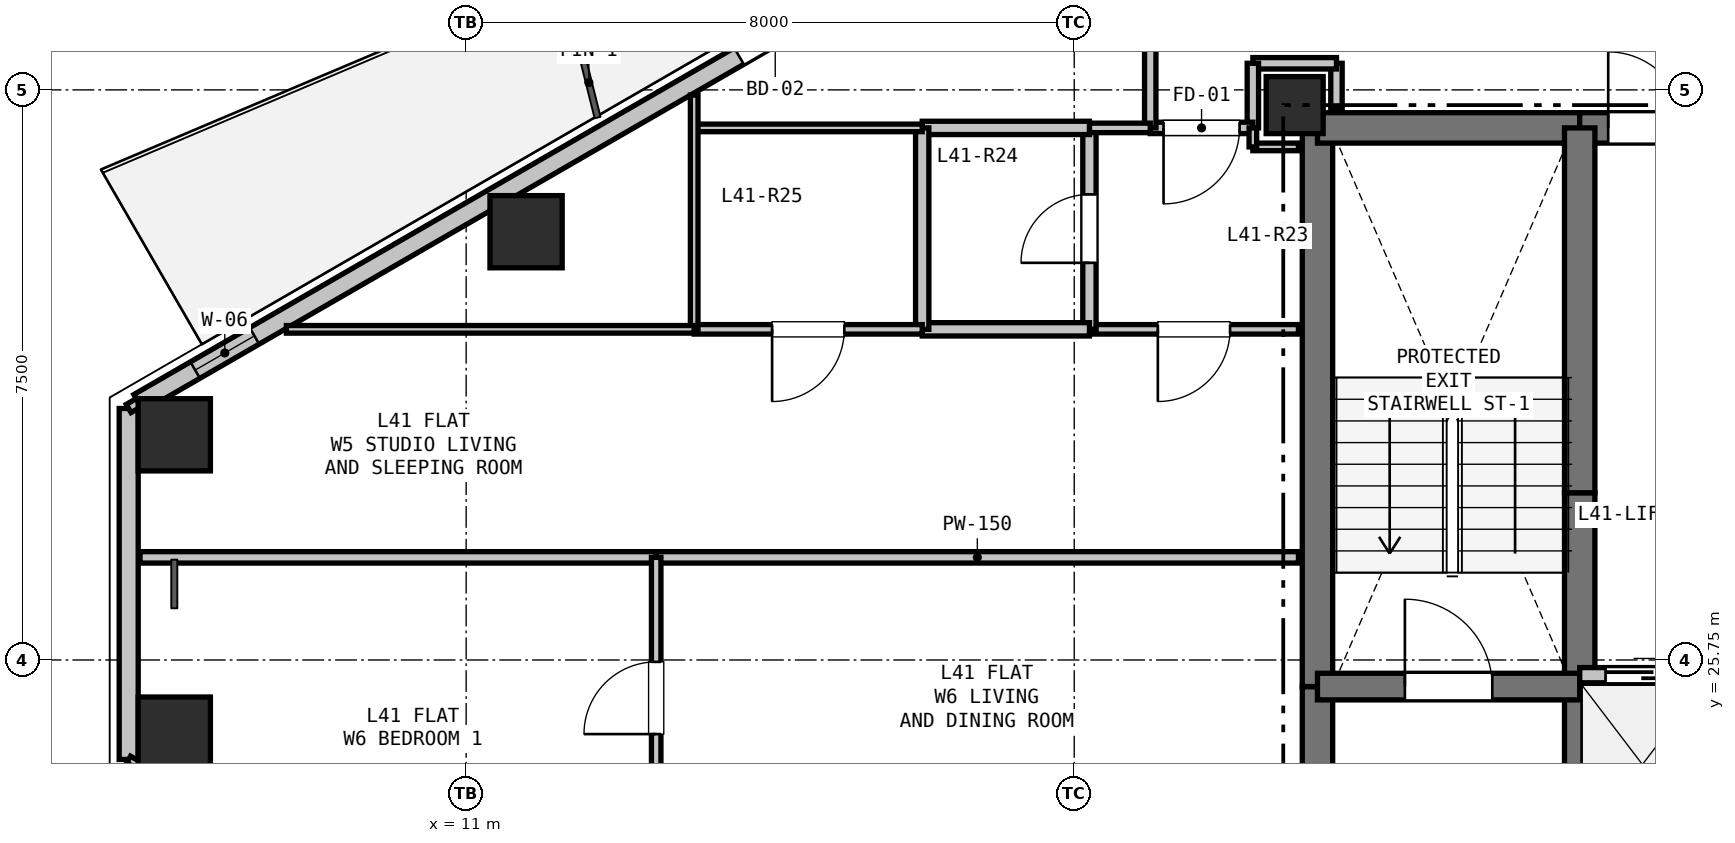
"""IFC4 building model, lengths in metres.
Left out: names, types, materials, properties, quantities, classifications, styles, units other than length and angle.
Written with IfcOpenShell. Run it as: python <this file> out.ifc"""

import sys

from ifc_helpers import new_model, si_unit, direction, frame, frame_2d, origin, origin_2d, place, context, subcontext, project, spatial, rectangle, hollow_rectangle, extrude, element, fill, save


model = new_model("IFC4")
c1 = context("Model", 3, precision=1e-05, world=origin(), true_north=direction((0.0, 1.0)))
c2 = subcontext(c1, "Body", "Model", "MODEL_VIEW")
j1 = project(units=[si_unit("LENGTHUNIT", "METRE"), si_unit("PLANEANGLEUNIT", "RADIAN")], contexts=[c1])
p1 = place(None, origin())
s1 = spatial("IfcSite", under=j1, at=p1, CompositionType="ELEMENT")
p2 = place(p1, origin())
s2 = spatial("IfcBuilding", under=s1, at=p2, CompositionType="ELEMENT")
p3 = place(p2, frame((0.0, 0.0, 147.6)))
s3 = spatial("IfcBuildingStorey", under=s2, at=p3, CompositionType="ELEMENT", Elevation=147.6)
p4 = place(p3, frame((21.9, 33.05, 0.0), z_axis=(0.0, 0.0, 1.0), x_axis=(1.0, 0.0, 0.0)))
e1 = element("IfcColumn", 1, at=p4, inside=s3, PredefinedType="COLUMN", context=c2, shape_type="SweptSolid", body=[
    extrude(rectangle(XDim=0.75, YDim=0.75, at=origin_2d()), origin(), (0.0, 0.0, 1.0), 3.3),
])
for number, where, z_axis, x_axis in (
    (2, (7.16, 28.712, 0.0), (0.0, 0.0, 1.0), (1.0, 0.0, 0.0)),
    (3, (11.788, 31.384, 0.0), (0.0, 0.0, 1.0), (1.0, 0.0, 0.0)),
    (4, (7.16, 24.788, 0.0), (0.0, 0.0, 1.0), (1.0, 0.0, 0.0)),
):
    element("IfcColumn", number, at=place(p3, frame(where, z_axis=z_axis, x_axis=x_axis)), inside=s3, PredefinedType="COLUMN", context=c2, shape_type="SweptSolid", body=[
        extrude(hollow_rectangle(XDim=0.95, YDim=0.95, WallThickness=0.028, at=origin_2d()), origin(), (0.0, 0.0, 1.0), 3.3),
    ])
p5 = place(p3, frame((6.56, 24.441, 0.0), z_axis=(0.0, 0.0, 1.0), x_axis=(0.0, 1.0, 0.0)))
e5 = element("IfcWall", 5, at=p5, inside=s3, PredefinedType="SOLIDWALL", context=c2, shape_type="SweptSolid", body=[
    extrude(rectangle(XDim=4.617, YDim=0.25, at=frame_2d((2.309, 0.0))), origin(), (0.0, 0.0, 1.0), 2.68),
])
p6 = place(p3, frame((6.69, 29.134, 0.0), z_axis=(0.0, 0.0, 1.0), x_axis=(0.866027848477, 0.499995765644, 0.0)))
e6 = element("IfcWall", 6, at=p6, inside=s3, PredefinedType="SOLIDWALL", context=c2, shape_type="SweptSolid", body=[
    extrude(rectangle(XDim=11.186, YDim=0.25, at=frame_2d((5.593, 0.0))), origin(), (0.0, 0.0, 1.0), 2.68),
])
p7 = place(p6, frame((9.122, 0.0, 0.0)))
e7 = element("IfcOpeningElement", 7, at=p7, cuts=e6, PredefinedType="OPENING", context=c2, shape_type="SweptSolid", body=[
    extrude(rectangle(XDim=1.1, YDim=2.1, at=frame_2d((0.55, 1.05))), frame((0.0, 0.135, 0.0), z_axis=(0.0, -1.0, 0.0), x_axis=(1.0, 0.0, 0.0)), (0.0, 0.0, 1.0), 0.27),
])
p8 = place(p6, frame((0.86, 0.0, 0.9)))
e8 = element("IfcOpeningElement", 8, at=p8, cuts=e6, PredefinedType="OPENING", context=c2, shape_type="SweptSolid", body=[
    extrude(rectangle(XDim=0.9, YDim=1.4, at=frame_2d((0.45, 0.7))), frame((0.0, 0.135, 0.0), z_axis=(0.0, -1.0, 0.0), x_axis=(1.0, 0.0, 0.0)), (0.0, 0.0, 1.0), 0.27),
])
p9 = place(p3, frame((16.378, 18.773, 0.0), z_axis=(0.0, 0.0, 1.0), x_axis=(-0.866027848477, 0.499995765644, 0.0)))
e9 = element("IfcWall", 9, at=p9, inside=s3, PredefinedType="SOLIDWALL", context=c2, shape_type="SweptSolid", body=[
    extrude(rectangle(XDim=11.186, YDim=0.25, at=frame_2d((5.593, 0.0))), origin(), (0.0, 0.0, 1.0), 2.68),
])
p10 = place(p9, frame((6.757, 0.0, 0.9)))
e10 = element("IfcOpeningElement", 10, at=p10, cuts=e9, PredefinedType="OPENING", context=c2, shape_type="SweptSolid", body=[
    extrude(rectangle(XDim=1.2, YDim=1.4, at=frame_2d((0.6, 0.7))), frame((0.0, 0.135, 0.0), z_axis=(0.0, -1.0, 0.0), x_axis=(1.0, 0.0, 0.0)), (0.0, 0.0, 1.0), 0.27),
])
p11 = place(p3, frame((22.2, 20.75, 0.0), z_axis=(0.0, 0.0, 1.0), x_axis=(0.0, 1.0, 0.0)))
e11 = element("IfcWall", 11, at=p11, inside=s3, PredefinedType="SHEAR", context=c2, shape_type="SweptSolid", body=[
    extrude(rectangle(XDim=4.65, YDim=0.4, at=frame_2d((2.325, 0.0))), origin(), (0.0, 0.0, 1.0), 3.06),
])
p12 = place(p3, frame((22.2, 25.4, 0.0), z_axis=(0.0, 0.0, 1.0), x_axis=(0.0, 1.0, 0.0)))
e12 = element("IfcWall", 12, at=p12, inside=s3, PredefinedType="SHEAR", context=c2, shape_type="SweptSolid", body=[
    extrude(rectangle(XDim=7.35, YDim=0.4, at=frame_2d((3.675, 0.0))), origin(), (0.0, 0.0, 1.0), 3.06),
])
p13 = place(p3, frame((22.2, 32.75, 0.0), z_axis=(0.0, 0.0, 1.0), x_axis=(1.0, 0.0, 0.0)))
e13 = element("IfcWall", 13, at=p13, inside=s3, PredefinedType="SHEAR", context=c2, shape_type="SweptSolid", body=[
    extrude(rectangle(XDim=3.45, YDim=0.4, at=frame_2d((1.725, 0.0))), origin(), (0.0, 0.0, 1.0), 3.06),
])
p14 = place(p3, frame((25.65, 32.75, 0.0), z_axis=(0.0, 0.0, 1.0), x_axis=(1.0, 0.0, 0.0)))
e14 = element("IfcWall", 14, at=p14, inside=s3, PredefinedType="SHEAR", context=c2, shape_type="SweptSolid", body=[
    extrude(rectangle(XDim=1.75, YDim=0.4, at=frame_2d((0.875, 0.0))), origin(), (0.0, 0.0, 1.0), 3.06),
])
p15 = place(p14, frame((0.375, 0.0, 0.0)))
e15 = element("IfcOpeningElement", 15, at=p15, cuts=e14, PredefinedType="OPENING", context=c2, shape_type="SweptSolid", body=[
    extrude(rectangle(XDim=1.0, YDim=2.15, at=frame_2d((0.5, 1.075))), frame((0.0, 0.21, 0.0), z_axis=(0.0, -1.0, 0.0), x_axis=(1.0, 0.0, 0.0)), (0.0, 0.0, 1.0), 0.42),
])
p16 = place(p3, frame((25.65, 22.75, 0.0), z_axis=(0.0, 0.0, 1.0), x_axis=(0.0, 1.0, 0.0)))
e16 = element("IfcWall", 16, at=p16, inside=s3, PredefinedType="SHEAR", context=c2, shape_type="SweptSolid", body=[
    extrude(rectangle(XDim=2.8, YDim=0.4, at=frame_2d((1.4, 0.0))), origin(), (0.0, 0.0, 1.0), 3.06),
])
p17 = place(p3, frame((25.65, 25.55, 0.0), z_axis=(0.0, 0.0, 1.0), x_axis=(0.0, 1.0, 0.0)))
e17 = element("IfcWall", 17, at=p17, inside=s3, PredefinedType="SHEAR", context=c2, shape_type="SweptSolid", body=[
    extrude(rectangle(XDim=2.4, YDim=0.4, at=frame_2d((1.2, 0.0))), origin(), (0.0, 0.0, 1.0), 3.06),
])
p18 = place(p3, frame((25.65, 27.95, 0.0), z_axis=(0.0, 0.0, 1.0), x_axis=(0.0, 1.0, 0.0)))
e18 = element("IfcWall", 18, at=p18, inside=s3, PredefinedType="SHEAR", context=c2, shape_type="SweptSolid", body=[
    extrude(rectangle(XDim=4.8, YDim=0.4, at=frame_2d((2.4, 0.0))), origin(), (0.0, 0.0, 1.0), 3.06),
])
p19 = place(p3, frame((22.2, 25.4, 0.0), z_axis=(0.0, 0.0, 1.0), x_axis=(1.0, 0.0, 0.0)))
e19 = element("IfcWall", 19, at=p19, inside=s3, PredefinedType="SHEAR", context=c2, shape_type="SweptSolid", body=[
    extrude(rectangle(XDim=3.45, YDim=0.35, at=frame_2d((1.725, 0.0))), origin(), (0.0, 0.0, 1.0), 3.06),
])
p20 = place(p19, frame((1.15, 0.0, 0.0)))
e20 = element("IfcOpeningElement", 20, at=p20, cuts=e19, PredefinedType="OPENING", context=c2, shape_type="SweptSolid", body=[
    extrude(rectangle(XDim=1.15, YDim=2.15, at=frame_2d((0.575, 1.075))), frame((0.0, 0.185, 0.0), z_axis=(0.0, -1.0, 0.0), x_axis=(1.0, 0.0, 0.0)), (0.0, 0.0, 1.0), 0.37),
])
p21 = place(p3, frame((25.65, 25.55, 0.0), z_axis=(0.0, 0.0, 1.0), x_axis=(1.0, 0.0, 0.0)))
e21 = element("IfcWall", 21, at=p21, inside=s3, PredefinedType="PARTITIONING", context=c2, shape_type="SweptSolid", body=[
    extrude(rectangle(XDim=4.95, YDim=0.2, at=frame_2d((2.475, 0.0))), origin(), (0.0, 0.0, 1.0), 3.06),
])
p22 = place(p21, frame((0.34, 0.0, 0.0)))
e22 = element("IfcOpeningElement", 22, at=p22, cuts=e21, PredefinedType="OPENING", context=c2, shape_type="SweptSolid", body=[
    extrude(rectangle(XDim=1.1, YDim=2.15, at=frame_2d((0.55, 1.075))), frame((0.0, 0.11, 0.0), z_axis=(0.0, -1.0, 0.0), x_axis=(1.0, 0.0, 0.0)), (0.0, 0.0, 1.0), 0.22),
])
p23 = place(p21, frame((1.99, 0.0, 0.0)))
e23 = element("IfcOpeningElement", 23, at=p23, cuts=e21, PredefinedType="OPENING", context=c2, shape_type="SweptSolid", body=[
    extrude(rectangle(XDim=1.1, YDim=2.15, at=frame_2d((0.55, 1.075))), frame((0.0, 0.11, 0.0), z_axis=(0.0, -1.0, 0.0), x_axis=(1.0, 0.0, 0.0)), (0.0, 0.0, 1.0), 0.22),
])
p24 = place(p21, frame((3.64, 0.0, 0.0)))
e24 = element("IfcOpeningElement", 24, at=p24, cuts=e21, PredefinedType="OPENING", context=c2, shape_type="SweptSolid", body=[
    extrude(rectangle(XDim=1.1, YDim=2.15, at=frame_2d((0.55, 1.075))), frame((0.0, 0.11, 0.0), z_axis=(0.0, -1.0, 0.0), x_axis=(1.0, 0.0, 0.0)), (0.0, 0.0, 1.0), 0.22),
])
p25 = place(p3, frame((22.45, 33.0, 0.0), z_axis=(0.0, 0.0, 1.0), x_axis=(0.0, 1.0, 0.0)))
e25 = element("IfcWall", 25, at=p25, inside=s3, PredefinedType="PARTITIONING", context=c2, shape_type="SweptSolid", body=[
    extrude(rectangle(XDim=0.6, YDim=0.15, at=frame_2d((0.3, 0.0))), origin(), (0.0, 0.0, 1.0), 2.585),
])
p26 = place(p3, frame((22.45, 33.6, 0.0), z_axis=(0.0, 0.0, 1.0), x_axis=(-1.0, 0.0, 0.0)))
e26 = element("IfcWall", 26, at=p26, inside=s3, PredefinedType="PARTITIONING", context=c2, shape_type="SweptSolid", body=[
    extrude(rectangle(XDim=1.1, YDim=0.15, at=frame_2d((0.55, 0.0))), origin(), (0.0, 0.0, 1.0), 3.06),
])
p27 = place(p3, frame((21.35, 33.6, 0.0), z_axis=(0.0, 0.0, 1.0), x_axis=(0.0, -1.0, 0.0)))
e27 = element("IfcWall", 27, at=p27, inside=s3, PredefinedType="PARTITIONING", context=c2, shape_type="SweptSolid", body=[
    extrude(rectangle(XDim=0.85, YDim=0.15, at=frame_2d((0.425, 0.0))), origin(), (0.0, 0.0, 1.0), 2.433),
])
p28 = place(p3, frame((21.35, 32.75, 0.0), z_axis=(0.0, 0.0, 1.0), x_axis=(-1.0, 0.0, 0.0)))
e28 = element("IfcWall", 28, at=p28, inside=s3, PredefinedType="PARTITIONING", context=c2, shape_type="SweptSolid", body=[
    extrude(rectangle(XDim=1.35, YDim=0.15, at=frame_2d((0.675, 0.0))), origin(), (0.0, 0.0, 1.0), 2.433),
])
p29 = place(p28, frame((0.175, 0.0, 0.0)))
e29 = element("IfcOpeningElement", 29, at=p29, cuts=e28, PredefinedType="OPENING", context=c2, shape_type="SweptSolid", body=[
    extrude(rectangle(XDim=1.0, YDim=2.15, at=frame_2d((0.5, 1.075))), frame((0.0, 0.085, 0.0), z_axis=(0.0, -1.0, 0.0), x_axis=(1.0, 0.0, 0.0)), (0.0, 0.0, 1.0), 0.17),
])
p30 = place(p3, frame((20.0, 32.75, 0.0), z_axis=(0.0, 0.0, 1.0), x_axis=(0.0, 1.0, 0.0)))
e30 = element("IfcWall", 30, at=p30, inside=s3, PredefinedType="PARTITIONING", context=c2, shape_type="SweptSolid", body=[
    extrude(rectangle(XDim=2.6, YDim=0.15, at=frame_2d((1.3, 0.0))), origin(), (0.0, 0.0, 1.0), 2.433),
])
p31 = place(p3, frame((21.35, 32.5, 0.0), z_axis=(0.0, 0.0, 1.0), x_axis=(1.0, 0.0, 0.0)))
e31 = element("IfcWall", 31, at=p31, inside=s3, PredefinedType="PARTITIONING", context=c2, shape_type="SweptSolid", body=[
    extrude(rectangle(XDim=0.6, YDim=0.1, at=frame_2d((0.3, 0.0))), origin(), (0.0, 0.0, 1.0), 2.585),
])
p32 = place(p3, frame((21.95, 30.1, 0.0), z_axis=(0.0, 0.0, 1.0), x_axis=(-1.0, 0.0, 0.0)))
e32 = element("IfcWall", 32, at=p32, inside=s3, PredefinedType="PARTITIONING", context=c2, shape_type="SweptSolid", body=[
    extrude(rectangle(XDim=2.75, YDim=0.125, at=frame_2d((1.375, 0.0))), origin(), (0.0, 0.0, 1.0), 2.585),
])
p33 = place(p32, frame((0.9, 0.0, 0.0)))
e33 = element("IfcOpeningElement", 33, at=p33, cuts=e32, PredefinedType="OPENING", context=c2, shape_type="SweptSolid", body=[
    extrude(rectangle(XDim=0.95, YDim=2.1, at=frame_2d((0.475, 1.05))), frame((0.0, 0.073, 0.0), z_axis=(0.0, -1.0, 0.0), x_axis=(1.0, 0.0, 0.0)), (0.0, 0.0, 1.0), 0.145),
])
p34 = place(p3, frame((19.2, 30.1, 0.0), z_axis=(0.0, 0.0, 1.0), x_axis=(0.0, 1.0, 0.0)))
e34 = element("IfcWall", 34, at=p34, inside=s3, PredefinedType="PLUMBINGWALL", context=c2, shape_type="SweptSolid", body=[
    extrude(rectangle(XDim=2.65, YDim=0.175, at=frame_2d((1.325, 0.0))), origin(), (0.0, 0.0, 1.0), 2.433),
])
p35 = place(p34, frame((0.875, 0.0, 0.0)))
e35 = element("IfcOpeningElement", 35, at=p35, cuts=e34, PredefinedType="OPENING", context=c2, shape_type="SweptSolid", body=[
    extrude(rectangle(XDim=0.9, YDim=2.1, at=frame_2d((0.45, 1.05))), frame((0.0, 0.097, 0.0), z_axis=(0.0, -1.0, 0.0), x_axis=(1.0, 0.0, 0.0)), (0.0, 0.0, 1.0), 0.195),
])
p36 = place(p3, frame((19.2, 32.75, 0.0), z_axis=(0.0, 0.0, 1.0), x_axis=(1.0, 0.0, 0.0)))
e36 = element("IfcWall", 36, at=p36, inside=s3, PredefinedType="PARTITIONING", context=c2, shape_type="SweptSolid", body=[
    extrude(rectangle(XDim=0.8, YDim=0.125, at=frame_2d((0.4, 0.0))), origin(), (0.0, 0.0, 1.0), 2.433),
])
p37 = place(p3, frame((21.35, 32.75, 0.0), z_axis=(0.0, 0.0, 1.0), x_axis=(0.0, -1.0, 0.0)))
e37 = element("IfcWall", 37, at=p37, inside=s3, PredefinedType="PARTITIONING", context=c2, shape_type="SweptSolid", body=[
    extrude(rectangle(XDim=0.25, YDim=0.1, at=frame_2d((0.125, 0.0))), origin(), (0.0, 0.0, 1.0), 3.06),
])
p38 = place(p3, frame((17.0, 32.75, 0.0), z_axis=(0.0, 0.0, 1.0), x_axis=(1.0, 0.0, 0.0)))
e38 = element("IfcWall", 38, at=p38, inside=s3, PredefinedType="PLUMBINGWALL", context=c2, shape_type="SweptSolid", body=[
    extrude(rectangle(XDim=2.2, YDim=0.175, at=frame_2d((1.1, 0.0))), origin(), (0.0, 0.0, 1.0), 2.433),
])
p39 = place(p3, frame((19.2, 30.1, 0.0), z_axis=(0.0, 0.0, 1.0), x_axis=(-1.0, 0.0, 0.0)))
e39 = element("IfcWall", 39, at=p39, inside=s3, PredefinedType="PLUMBINGWALL", context=c2, shape_type="SweptSolid", body=[
    extrude(rectangle(XDim=2.2, YDim=0.175, at=frame_2d((1.1, 0.0))), origin(), (0.0, 0.0, 1.0), 3.06),
])
p40 = place(p3, frame((17.0, 30.1, 0.0), z_axis=(0.0, 0.0, 1.0), x_axis=(0.0, 1.0, 0.0)))
e40 = element("IfcWall", 40, at=p40, inside=s3, PredefinedType="PLUMBINGWALL", context=c2, shape_type="SweptSolid", body=[
    extrude(rectangle(XDim=2.65, YDim=0.175, at=frame_2d((1.325, 0.0))), origin(), (0.0, 0.0, 1.0), 2.433),
])
p41 = place(p3, frame((14.0, 32.75, 0.0), z_axis=(0.0, 0.0, 1.0), x_axis=(1.0, 0.0, 0.0)))
e41 = element("IfcWall", 41, at=p41, inside=s3, PredefinedType="PARTITIONING", context=c2, shape_type="SweptSolid", body=[
    extrude(rectangle(XDim=3.0, YDim=0.1, at=frame_2d((1.5, 0.0))), origin(), (0.0, 0.0, 1.0), 2.365),
])
p42 = place(p3, frame((17.0, 30.1, 0.0), z_axis=(0.0, 0.0, 1.0), x_axis=(-1.0, 0.0, 0.0)))
e42 = element("IfcWall", 42, at=p42, inside=s3, PredefinedType="PARTITIONING", context=c2, shape_type="SweptSolid", body=[
    extrude(rectangle(XDim=3.0, YDim=0.125, at=frame_2d((1.5, 0.0))), origin(), (0.0, 0.0, 1.0), 3.06),
])
p43 = place(p42, frame((1.025, 0.0, 0.0)))
e43 = element("IfcOpeningElement", 43, at=p43, cuts=e42, PredefinedType="OPENING", context=c2, shape_type="SweptSolid", body=[
    extrude(rectangle(XDim=0.95, YDim=2.1, at=frame_2d((0.475, 1.05))), frame((0.0, 0.073, 0.0), z_axis=(0.0, -1.0, 0.0), x_axis=(1.0, 0.0, 0.0)), (0.0, 0.0, 1.0), 0.145),
])
p44 = place(p3, frame((14.0, 30.1, 0.0), z_axis=(0.0, 0.0, 1.0), x_axis=(0.0, 1.0, 0.0)))
e44 = element("IfcWall", 44, at=p44, inside=s3, PredefinedType="PARTITIONING", context=c2, shape_type="SweptSolid", body=[
    extrude(rectangle(XDim=3.082, YDim=0.1, at=frame_2d((1.541, 0.0))), origin(), (0.0, 0.0, 1.0), 2.365),
])
p45 = place(p3, frame((8.635, 30.1, 0.0), z_axis=(0.0, 0.0, 1.0), x_axis=(1.0, 0.0, 0.0)))
e45 = element("IfcWall", 45, at=p45, inside=s3, PredefinedType="PARTITIONING", context=c2, shape_type="SweptSolid", body=[
    extrude(rectangle(XDim=5.365, YDim=0.1, at=frame_2d((2.683, 0.0))), origin(), (0.0, 0.0, 1.0), 2.724),
])
p46 = place(p3, frame((21.95, 27.1, 0.0), z_axis=(0.0, 0.0, 1.0), x_axis=(-1.0, 0.0, 0.0)))
e46 = element("IfcWall", 46, at=p46, inside=s3, PredefinedType="PARTITIONING", context=c2, shape_type="SweptSolid", body=[
    extrude(rectangle(XDim=8.45, YDim=0.15, at=frame_2d((4.225, 0.0))), origin(), (0.0, 0.0, 1.0), 2.585),
])
p47 = place(p3, frame((13.5, 27.1, 0.0), z_axis=(0.0, 0.0, 1.0), x_axis=(-1.0, 0.0, 0.0)))
e47 = element("IfcWall", 47, at=p47, inside=s3, PredefinedType="PARTITIONING", context=c2, shape_type="SweptSolid", body=[
    extrude(rectangle(XDim=6.791, YDim=0.15, at=frame_2d((3.396, 0.0))), origin(), (0.0, 0.0, 1.0), 2.724),
])
p48 = place(p3, frame((6.56, 29.059, 0.0), z_axis=(0.0, 0.0, 1.0), x_axis=(0.866131372301, 0.499816412211, 0.0)))
e48 = element("IfcWall", 48, at=p48, inside=s3, PredefinedType="PARTITIONING", context=c2, shape_type="SweptSolid", body=[
    extrude(rectangle(XDim=0.15, YDim=0.125, at=frame_2d((0.075, 0.0))), origin(), (0.0, 0.0, 1.0), 3.06),
])
p49 = place(p3, frame((13.5, 23.4, 0.0), z_axis=(0.0, 0.0, 1.0), x_axis=(0.0, 1.0, 0.0)))
e49 = element("IfcWall", 49, at=p49, inside=s3, PredefinedType="PARTITIONING", context=c2, shape_type="SweptSolid", body=[
    extrude(rectangle(XDim=3.7, YDim=0.125, at=frame_2d((1.85, 0.0))), origin(), (0.0, 0.0, 1.0), 3.06),
])
p50 = place(p49, frame((1.375, 0.0, 0.0)))
e50 = element("IfcOpeningElement", 50, at=p50, cuts=e49, PredefinedType="OPENING", context=c2, shape_type="SweptSolid", body=[
    extrude(rectangle(XDim=0.95, YDim=2.1, at=frame_2d((0.475, 1.05))), frame((0.0, 0.073, 0.0), z_axis=(0.0, -1.0, 0.0), x_axis=(1.0, 0.0, 0.0)), (0.0, 0.0, 1.0), 0.145),
])
p51 = place(p3, frame((6.69, 24.366, 0.0), z_axis=(0.0, 0.0, 1.0), x_axis=(-0.866131372301, 0.499816412211, 0.0)))
e51 = element("IfcWall", 51, at=p51, inside=s3, PredefinedType="PARTITIONING", context=c2, shape_type="SweptSolid", body=[
    extrude(rectangle(XDim=0.15, YDim=0.1, at=frame_2d((0.075, 0.0))), origin(), (0.0, 0.0, 1.0), 3.06),
])
p52 = place(p7, origin())
e52 = element("IfcDoor", 52, at=p52, inside=s3, OperationType="SINGLE_SWING_RIGHT", PredefinedType="DOOR", context=c2, shape_type="SweptSolid", body=[
    extrude(rectangle(XDim=1.1, YDim=2.1, at=frame_2d((0.55, 1.05))), frame((0.0, 0.025, 0.0), z_axis=(0.0, -1.0, 0.0), x_axis=(1.0, 0.0, 0.0)), (0.0, 0.0, 1.0), 0.05),
])
fill(e7, e52)
p53 = place(p8, origin())
e53 = element("IfcWindow", 53, at=p53, inside=s3, PartitioningType="SINGLE_PANEL", PredefinedType="WINDOW", context=c2, shape_type="SweptSolid", body=[
    extrude(rectangle(XDim=0.9, YDim=1.4, at=frame_2d((0.45, 0.7))), frame((0.0, 0.03, 0.0), z_axis=(0.0, -1.0, 0.0), x_axis=(1.0, 0.0, 0.0)), (0.0, 0.0, 1.0), 0.06),
])
fill(e8, e53)
p54 = place(p22, origin())
e54 = element("IfcDoor", 54, at=p54, inside=s3, OperationType="SLIDING_TO_LEFT", PredefinedType="DOOR", context=c2, shape_type="SweptSolid", body=[
    extrude(rectangle(XDim=1.1, YDim=2.15, at=frame_2d((0.55, 1.075))), frame((0.0, 0.025, 0.0), z_axis=(0.0, -1.0, 0.0), x_axis=(1.0, 0.0, 0.0)), (0.0, 0.0, 1.0), 0.05),
])
fill(e22, e54)
p55 = place(p15, origin())
e55 = element("IfcDoor", 55, at=p55, inside=s3, OperationType="SINGLE_SWING_LEFT", PredefinedType="DOOR", context=c2, shape_type="SweptSolid", body=[
    extrude(rectangle(XDim=1.0, YDim=2.15, at=frame_2d((0.5, 1.075))), frame((0.0, 0.025, 0.0), z_axis=(0.0, -1.0, 0.0), x_axis=(1.0, 0.0, 0.0)), (0.0, 0.0, 1.0), 0.05),
])
fill(e15, e55)
p56 = place(p20, origin())
e56 = element("IfcDoor", 56, at=p56, inside=s3, OperationType="SINGLE_SWING_LEFT", PredefinedType="DOOR", context=c2, shape_type="SweptSolid", body=[
    extrude(rectangle(XDim=1.15, YDim=2.15, at=frame_2d((0.575, 1.075))), frame((0.0, 0.025, 0.0), z_axis=(0.0, -1.0, 0.0), x_axis=(1.0, 0.0, 0.0)), (0.0, 0.0, 1.0), 0.05),
])
fill(e20, e56)
p57 = place(p29, origin())
e57 = element("IfcDoor", 57, at=p57, inside=s3, OperationType="SINGLE_SWING_RIGHT", PredefinedType="DOOR", context=c2, shape_type="SweptSolid", body=[
    extrude(rectangle(XDim=1.0, YDim=2.15, at=frame_2d((0.5, 1.075))), frame((0.0, 0.025, 0.0), z_axis=(0.0, -1.0, 0.0), x_axis=(1.0, 0.0, 0.0)), (0.0, 0.0, 1.0), 0.05),
])
fill(e29, e57)
p58 = place(p35, origin())
e58 = element("IfcDoor", 58, at=p58, inside=s3, OperationType="SINGLE_SWING_LEFT", PredefinedType="DOOR", context=c2, shape_type="SweptSolid", body=[
    extrude(rectangle(XDim=0.9, YDim=2.1, at=frame_2d((0.45, 1.05))), frame((0.0, 0.025, 0.0), z_axis=(0.0, -1.0, 0.0), x_axis=(1.0, 0.0, 0.0)), (0.0, 0.0, 1.0), 0.05),
])
fill(e35, e58)
p59 = place(p33, origin())
e59 = element("IfcDoor", 59, at=p59, inside=s3, OperationType="SINGLE_SWING_RIGHT", PredefinedType="DOOR", context=c2, shape_type="SweptSolid", body=[
    extrude(rectangle(XDim=0.95, YDim=2.1, at=frame_2d((0.475, 1.05))), frame((0.0, 0.025, 0.0), z_axis=(0.0, -1.0, 0.0), x_axis=(1.0, 0.0, 0.0)), (0.0, 0.0, 1.0), 0.05),
])
fill(e33, e59)
p60 = place(p43, origin())
e60 = element("IfcDoor", 60, at=p60, inside=s3, OperationType="SINGLE_SWING_RIGHT", PredefinedType="DOOR", context=c2, shape_type="SweptSolid", body=[
    extrude(rectangle(XDim=0.95, YDim=2.1, at=frame_2d((0.475, 1.05))), frame((0.0, 0.025, 0.0), z_axis=(0.0, -1.0, 0.0), x_axis=(1.0, 0.0, 0.0)), (0.0, 0.0, 1.0), 0.05),
])
fill(e43, e60)
p61 = place(p50, origin())
e61 = element("IfcDoor", 61, at=p61, inside=s3, OperationType="SINGLE_SWING_LEFT", PredefinedType="DOOR", context=c2, shape_type="SweptSolid", body=[
    extrude(rectangle(XDim=0.95, YDim=2.1, at=frame_2d((0.475, 1.05))), frame((0.0, 0.025, 0.0), z_axis=(0.0, -1.0, 0.0), x_axis=(1.0, 0.0, 0.0)), (0.0, 0.0, 1.0), 0.05),
])
fill(e50, e61)
save(model, sys.argv[1])
